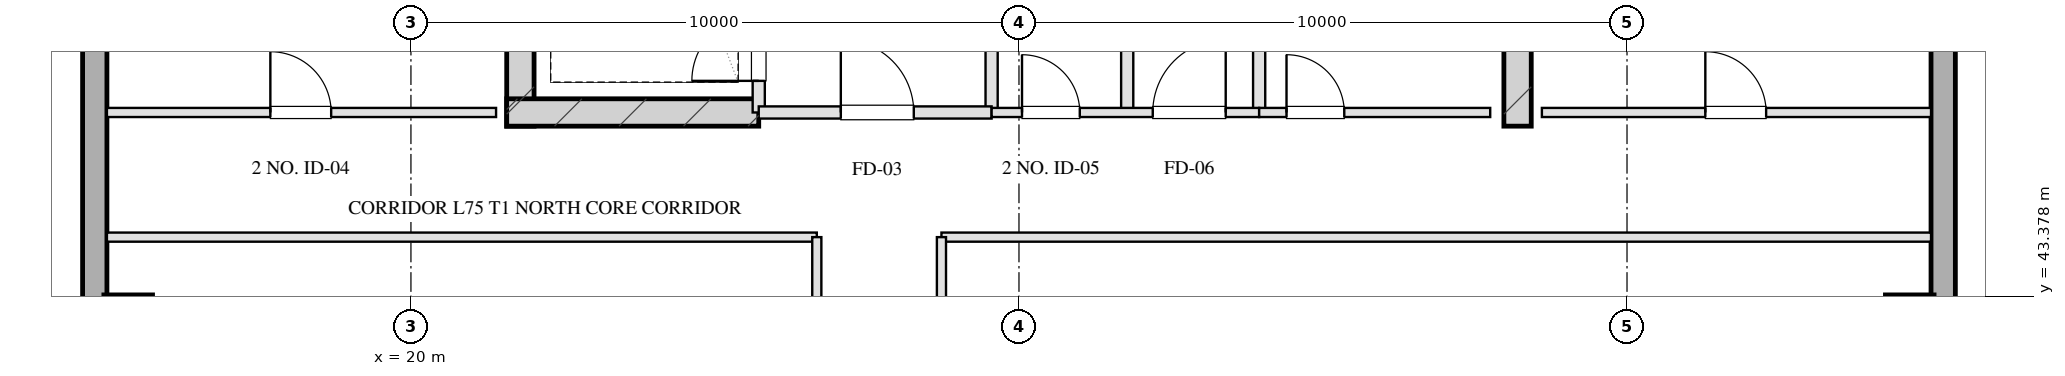
"""IFC4 building model, lengths in metres.
Left out: names, types, materials, properties, quantities, classifications, styles, units other than length and angle.
Written with IfcOpenShell. Run it as: python <this file> out.ifc"""

import sys

from ifc_helpers import new_model, si_unit, direction, frame, frame_2d, origin, origin_2d, place, context, subcontext, project, spatial, rectangle, hollow_rectangle, extrude, element, fill, save


model = new_model("IFC4")
c1 = context("Model", 3, precision=1e-05, world=origin(), true_north=direction((0.0, 1.0)))
c2 = subcontext(c1, "Body", "Model", "MODEL_VIEW")
j1 = project(units=[si_unit("LENGTHUNIT", "METRE"), si_unit("PLANEANGLEUNIT", "RADIAN")], contexts=[c1])
p1 = place(None, origin())
s1 = spatial("IfcSite", under=j1, at=p1, CompositionType="ELEMENT")
p2 = place(p1, origin())
s2 = spatial("IfcBuilding", under=s1, at=p2, CompositionType="ELEMENT")
p3 = place(p2, frame((0.0, 0.0, 272.8)))
s3 = spatial("IfcBuildingStorey", under=s2, at=p3, CompositionType="ELEMENT", Elevation=272.8)
for number, where, z_axis, x_axis in (
    (1, (21.8, 46.175, 0.0), (0.0, 0.0, 1.0), (0.0, 1.0, 0.0)),
    (2, (38.2, 46.175, 0.0), (0.0, 0.0, 1.0), (0.0, 1.0, 0.0)),
):
    element("IfcWall", number, at=place(p3, frame(where, z_axis=z_axis, x_axis=x_axis)), inside=s3, PredefinedType="SHEAR", context=c2, shape_type="SweptSolid", body=[
        extrude(rectangle(XDim=9.33, YDim=0.45, at=frame_2d((4.665, 0.0))), origin(), (0.0, 0.0, 1.0), 3.2),
    ])
p4 = place(p3, frame((21.575, 46.4, 0.0), z_axis=(0.0, 0.0, 1.0), x_axis=(1.0, 0.0, 0.0)))
e3 = element("IfcWall", 3, at=p4, inside=s3, PredefinedType="SHEAR", context=c2, shape_type="SweptSolid", body=[
    extrude(rectangle(XDim=4.145, YDim=0.45, at=frame_2d((2.073, 0.0))), origin(), (0.0, 0.0, 1.0), 3.2),
])
for number, where, z_axis, x_axis in (
    (4, (15.35, 43.0, 0.0), (0.0, 0.0, 1.0), (1.0, 0.0, 0.0)),
    (5, (44.65, 43.0, 0.0), (0.0, 0.0, 1.0), (1.0, 0.0, 0.0)),
):
    element("IfcColumn", number, at=place(p3, frame(where, z_axis=z_axis, x_axis=x_axis)), inside=s3, PredefinedType="COLUMN", context=c2, shape_type="SweptSolid", body=[
        extrude(hollow_rectangle(XDim=0.8, YDim=0.8, WallThickness=0.028, at=origin_2d()), origin(), (0.0, 0.0, 1.0), 3.201),
    ])
p5 = place(p3, frame((14.8, 13.1, 0.0), z_axis=(0.0, 0.0, 1.0), x_axis=(0.0, 1.0, 0.0)))
e6 = element("IfcWall", 6, at=p5, inside=s3, PredefinedType="SOLIDWALL", context=c2, shape_type="SweptSolid", body=[
    extrude(rectangle(XDim=41.8, YDim=0.4, at=frame_2d((20.9, 0.0))), origin(), (0.0, 0.0, 1.0), 2.36),
])
p6 = place(p5, frame((13.525, 0.0, 0.75)))
e7 = element("IfcOpeningElement", 7, at=p6, cuts=e6, PredefinedType="OPENING", context=c2, shape_type="SweptSolid", body=[
    extrude(rectangle(XDim=1.95, YDim=1.21, at=frame_2d((0.975, 0.605))), frame((0.0, 0.21, 0.0), z_axis=(0.0, -1.0, 0.0), x_axis=(1.0, 0.0, 0.0)), (0.0, 0.0, 1.0), 0.42),
])
p7 = place(p5, frame((17.325, 0.0, 0.75)))
e8 = element("IfcOpeningElement", 8, at=p7, cuts=e6, PredefinedType="OPENING", context=c2, shape_type="SweptSolid", body=[
    extrude(rectangle(XDim=1.95, YDim=1.21, at=frame_2d((0.975, 0.605))), frame((0.0, 0.21, 0.0), z_axis=(0.0, -1.0, 0.0), x_axis=(1.0, 0.0, 0.0)), (0.0, 0.0, 1.0), 0.42),
])
p8 = place(p5, frame((22.525, 0.0, 0.75)))
e9 = element("IfcOpeningElement", 9, at=p8, cuts=e6, PredefinedType="OPENING", context=c2, shape_type="SweptSolid", body=[
    extrude(rectangle(XDim=1.95, YDim=1.21, at=frame_2d((0.975, 0.605))), frame((0.0, 0.21, 0.0), z_axis=(0.0, -1.0, 0.0), x_axis=(1.0, 0.0, 0.0)), (0.0, 0.0, 1.0), 0.42),
])
p9 = place(p5, frame((26.325, 0.0, 0.75)))
e10 = element("IfcOpeningElement", 10, at=p9, cuts=e6, PredefinedType="OPENING", context=c2, shape_type="SweptSolid", body=[
    extrude(rectangle(XDim=1.95, YDim=1.21, at=frame_2d((0.975, 0.605))), frame((0.0, 0.21, 0.0), z_axis=(0.0, -1.0, 0.0), x_axis=(1.0, 0.0, 0.0)), (0.0, 0.0, 1.0), 0.42),
])
p10 = place(p3, frame((45.2, 54.9, 0.0), z_axis=(0.0, 0.0, 1.0), x_axis=(0.0, -1.0, 0.0)))
e11 = element("IfcWall", 11, at=p10, inside=s3, PredefinedType="SOLIDWALL", context=c2, shape_type="SweptSolid", body=[
    extrude(rectangle(XDim=41.8, YDim=0.4, at=frame_2d((20.9, 0.0))), origin(), (0.0, 0.0, 1.0), 2.36),
])
p11 = place(p10, frame((26.325, 0.0, 0.75)))
e12 = element("IfcOpeningElement", 12, at=p11, cuts=e11, PredefinedType="OPENING", context=c2, shape_type="SweptSolid", body=[
    extrude(rectangle(XDim=1.95, YDim=1.21, at=frame_2d((0.975, 0.605))), frame((0.0, 0.21, 0.0), z_axis=(0.0, -1.0, 0.0), x_axis=(1.0, 0.0, 0.0)), (0.0, 0.0, 1.0), 0.42),
])
p12 = place(p10, frame((22.525, 0.0, 0.75)))
e13 = element("IfcOpeningElement", 13, at=p12, cuts=e11, PredefinedType="OPENING", context=c2, shape_type="SweptSolid", body=[
    extrude(rectangle(XDim=1.95, YDim=1.21, at=frame_2d((0.975, 0.605))), frame((0.0, 0.21, 0.0), z_axis=(0.0, -1.0, 0.0), x_axis=(1.0, 0.0, 0.0)), (0.0, 0.0, 1.0), 0.42),
])
p13 = place(p10, frame((17.325, 0.0, 0.75)))
e14 = element("IfcOpeningElement", 14, at=p13, cuts=e11, PredefinedType="OPENING", context=c2, shape_type="SweptSolid", body=[
    extrude(rectangle(XDim=1.95, YDim=1.21, at=frame_2d((0.975, 0.605))), frame((0.0, 0.21, 0.0), z_axis=(0.0, -1.0, 0.0), x_axis=(1.0, 0.0, 0.0)), (0.0, 0.0, 1.0), 0.42),
])
p14 = place(p10, frame((13.525, 0.0, 0.75)))
e15 = element("IfcOpeningElement", 15, at=p14, cuts=e11, PredefinedType="OPENING", context=c2, shape_type="SweptSolid", body=[
    extrude(rectangle(XDim=1.95, YDim=1.21, at=frame_2d((0.975, 0.605))), frame((0.0, 0.21, 0.0), z_axis=(0.0, -1.0, 0.0), x_axis=(1.0, 0.0, 0.0)), (0.0, 0.0, 1.0), 0.42),
])
p15 = place(p3, frame((25.72, 46.4, 0.0), z_axis=(0.0, 0.0, 1.0), x_axis=(0.0, 1.0, 0.0)))
e16 = element("IfcWall", 16, at=p15, inside=s3, PredefinedType="PARTITIONING", context=c2, shape_type="SweptSolid", body=[
    extrude(rectangle(XDim=1.9, YDim=0.2, at=frame_2d((0.95, 0.0))), origin(), (0.0, 0.0, 1.0), 2.925),
])
p16 = place(p15, frame((0.52, 0.0, 0.0)))
e17 = element("IfcOpeningElement", 17, at=p16, cuts=e16, PredefinedType="OPENING", context=c2, shape_type="SweptSolid", body=[
    extrude(rectangle(XDim=1.1, YDim=2.05, at=frame_2d((0.55, 1.025))), frame((0.0, 0.11, 0.0), z_axis=(0.0, -1.0, 0.0), x_axis=(1.0, 0.0, 0.0)), (0.0, 0.0, 1.0), 0.22),
])
p17 = place(p3, frame((29.55, 46.4, 0.0), z_axis=(0.0, 0.0, 1.0), x_axis=(0.0, 1.0, 0.0)))
e18 = element("IfcWall", 18, at=p17, inside=s3, PredefinedType="PARTITIONING", context=c2, shape_type="SweptSolid", body=[
    extrude(rectangle(XDim=8.43, YDim=0.2, at=frame_2d((4.215, 0.0))), origin(), (0.0, 0.0, 1.0), 2.925),
])
p18 = place(p3, frame((25.72, 46.4, 0.0), z_axis=(0.0, 0.0, 1.0), x_axis=(1.0, 0.0, 0.0)))
e19 = element("IfcWall", 19, at=p18, inside=s3, PredefinedType="PARTITIONING", context=c2, shape_type="SweptSolid", body=[
    extrude(rectangle(XDim=3.83, YDim=0.2, at=frame_2d((1.915, 0.0))), origin(), (0.0, 0.0, 1.0), 2.925),
])
p19 = place(p18, frame((1.35, 0.0, 0.0)))
e20 = element("IfcOpeningElement", 20, at=p19, cuts=e19, PredefinedType="OPENING", context=c2, shape_type="SweptSolid", body=[
    extrude(rectangle(XDim=1.2, YDim=2.05, at=frame_2d((0.6, 1.025))), frame((0.0, 0.11, 0.0), z_axis=(0.0, -1.0, 0.0), x_axis=(1.0, 0.0, 0.0)), (0.0, 0.0, 1.0), 0.22),
])
for number, where, z_axis, x_axis in (
    (21, (33.95, 46.4, 0.0), (0.0, 0.0, 1.0), (0.0, 1.0, 0.0)),
    (22, (31.78, 46.4, 0.0), (0.0, 0.0, 1.0), (0.0, 1.0, 0.0)),
):
    element("IfcWall", number, at=place(p3, frame(where, z_axis=z_axis, x_axis=x_axis)), inside=s3, PredefinedType="PARTITIONING", context=c2, shape_type="SweptSolid", body=[
        extrude(rectangle(XDim=8.43, YDim=0.2, at=frame_2d((4.215, 0.0))), origin(), (0.0, 0.0, 1.0), 2.925),
    ])
p20 = place(p3, frame((29.55, 46.4, 0.0), z_axis=(0.0, 0.0, 1.0), x_axis=(1.0, 0.0, 0.0)))
e23 = element("IfcWall", 23, at=p20, inside=s3, PredefinedType="PARTITIONING", context=c2, shape_type="SweptSolid", body=[
    extrude(rectangle(XDim=4.4, YDim=0.15, at=frame_2d((2.2, 0.0))), origin(), (0.0, 0.0, 1.0), 2.925),
])
p21 = place(p20, frame((0.5, 0.0, 0.0)))
e24 = element("IfcOpeningElement", 24, at=p21, cuts=e23, PredefinedType="OPENING", context=c2, shape_type="SweptSolid", body=[
    extrude(rectangle(XDim=0.95, YDim=2.05, at=frame_2d((0.475, 1.025))), frame((0.0, 0.085, 0.0), z_axis=(0.0, -1.0, 0.0), x_axis=(1.0, 0.0, 0.0)), (0.0, 0.0, 1.0), 0.17),
])
p22 = place(p20, frame((2.65, 0.0, 0.0)))
e25 = element("IfcOpeningElement", 25, at=p22, cuts=e23, PredefinedType="OPENING", context=c2, shape_type="SweptSolid", body=[
    extrude(rectangle(XDim=1.2, YDim=2.05, at=frame_2d((0.6, 1.025))), frame((0.0, 0.085, 0.0), z_axis=(0.0, -1.0, 0.0), x_axis=(1.0, 0.0, 0.0)), (0.0, 0.0, 1.0), 0.17),
])
p23 = place(p3, frame((33.95, 46.4, 0.0), z_axis=(0.0, 0.0, 1.0), x_axis=(1.0, 0.0, 0.0)))
e26 = element("IfcWall", 26, at=p23, inside=s3, PredefinedType="PARTITIONING", context=c2, shape_type="SweptSolid", body=[
    extrude(rectangle(XDim=3.8, YDim=0.15, at=frame_2d((1.9, 0.0))), origin(), (0.0, 0.0, 1.0), 2.925),
])
p24 = place(p23, frame((0.45, 0.0, 0.0)))
e27 = element("IfcOpeningElement", 27, at=p24, cuts=e26, PredefinedType="OPENING", context=c2, shape_type="SweptSolid", body=[
    extrude(rectangle(XDim=0.95, YDim=2.05, at=frame_2d((0.475, 1.025))), frame((0.0, 0.085, 0.0), z_axis=(0.0, -1.0, 0.0), x_axis=(1.0, 0.0, 0.0)), (0.0, 0.0, 1.0), 0.17),
])
p25 = place(p3, frame((15.0, 46.4, 0.0), z_axis=(0.0, 0.0, 1.0), x_axis=(1.0, 0.0, 0.0)))
e28 = element("IfcWall", 28, at=p25, inside=s3, PredefinedType="PARTITIONING", context=c2, shape_type="SweptSolid", body=[
    extrude(rectangle(XDim=6.4, YDim=0.15, at=frame_2d((3.2, 0.0))), origin(), (0.0, 0.0, 1.0), 2.925),
])
p26 = place(p25, frame((2.688, 0.0, 0.0)))
e29 = element("IfcOpeningElement", 29, at=p26, cuts=e28, PredefinedType="OPENING", context=c2, shape_type="SweptSolid", body=[
    extrude(rectangle(XDim=1.0, YDim=2.05, at=frame_2d((0.5, 1.025))), frame((0.0, 0.085, 0.0), z_axis=(0.0, -1.0, 0.0), x_axis=(1.0, 0.0, 0.0)), (0.0, 0.0, 1.0), 0.17),
])
p27 = place(p3, frame((38.6, 46.4, 0.0), z_axis=(0.0, 0.0, 1.0), x_axis=(1.0, 0.0, 0.0)))
e30 = element("IfcWall", 30, at=p27, inside=s3, PredefinedType="PARTITIONING", context=c2, shape_type="SweptSolid", body=[
    extrude(rectangle(XDim=6.4, YDim=0.15, at=frame_2d((3.2, 0.0))), origin(), (0.0, 0.0, 1.0), 2.925),
])
p28 = place(p27, frame((2.688, 0.0, 0.0)))
e31 = element("IfcOpeningElement", 31, at=p28, cuts=e30, PredefinedType="OPENING", context=c2, shape_type="SweptSolid", body=[
    extrude(rectangle(XDim=1.0, YDim=2.05, at=frame_2d((0.5, 1.025))), frame((0.0, 0.085, 0.0), z_axis=(0.0, -1.0, 0.0), x_axis=(1.0, 0.0, 0.0)), (0.0, 0.0, 1.0), 0.17),
])
p29 = place(p3, frame((15.0, 44.35, 0.0), z_axis=(0.0, 0.0, 1.0), x_axis=(1.0, 0.0, 0.0)))
e32 = element("IfcWall", 32, at=p29, inside=s3, PredefinedType="PARTITIONING", context=c2, shape_type="SweptSolid", body=[
    extrude(rectangle(XDim=11.675, YDim=0.15, at=frame_2d((5.837, 0.0))), origin(), (0.0, 0.0, 1.0), 2.925),
])
p30 = place(p3, frame((28.725, 44.35, 0.0), z_axis=(0.0, 0.0, 1.0), x_axis=(1.0, 0.0, 0.0)))
e33 = element("IfcWall", 33, at=p30, inside=s3, PredefinedType="PARTITIONING", context=c2, shape_type="SweptSolid", body=[
    extrude(rectangle(XDim=16.275, YDim=0.15, at=frame_2d((8.137, 0.0))), origin(), (0.0, 0.0, 1.0), 2.925),
])
p31 = place(p3, frame((26.675, 23.65, 0.0), z_axis=(0.0, 0.0, 1.0), x_axis=(0.0, 1.0, 0.0)))
e34 = element("IfcWall", 34, at=p31, inside=s3, PredefinedType="PARTITIONING", context=c2, shape_type="SweptSolid", body=[
    extrude(rectangle(XDim=20.7, YDim=0.15, at=frame_2d((10.35, 0.0))), origin(), (0.0, 0.0, 1.0), 2.925),
])
p32 = place(p31, frame((2.175, 0.0, 0.0)))
e35 = element("IfcOpeningElement", 35, at=p32, cuts=e34, PredefinedType="OPENING", context=c2, shape_type="SweptSolid", body=[
    extrude(rectangle(XDim=0.85, YDim=2.05, at=frame_2d((0.425, 1.025))), frame((0.0, 0.085, 0.0), z_axis=(0.0, -1.0, 0.0), x_axis=(1.0, 0.0, 0.0)), (0.0, 0.0, 1.0), 0.17),
])
p33 = place(p31, frame((6.999, 0.0, 0.0)))
e36 = element("IfcOpeningElement", 36, at=p33, cuts=e34, PredefinedType="OPENING", context=c2, shape_type="SweptSolid", body=[
    extrude(rectangle(XDim=1.0, YDim=2.05, at=frame_2d((0.5, 1.025))), frame((0.0, 0.085, 0.0), z_axis=(0.0, -1.0, 0.0), x_axis=(1.0, 0.0, 0.0)), (0.0, 0.0, 1.0), 0.17),
])
p34 = place(p31, frame((11.838, 0.0, 0.0)))
e37 = element("IfcOpeningElement", 37, at=p34, cuts=e34, PredefinedType="OPENING", context=c2, shape_type="SweptSolid", body=[
    extrude(rectangle(XDim=1.05, YDim=2.05, at=frame_2d((0.525, 1.025))), frame((0.0, 0.085, 0.0), z_axis=(0.0, -1.0, 0.0), x_axis=(1.0, 0.0, 0.0)), (0.0, 0.0, 1.0), 0.17),
])
p35 = place(p31, frame((17.365, 0.0, 0.0)))
e38 = element("IfcOpeningElement", 38, at=p35, cuts=e34, PredefinedType="OPENING", context=c2, shape_type="SweptSolid", body=[
    extrude(rectangle(XDim=1.0, YDim=2.05, at=frame_2d((0.5, 1.025))), frame((0.0, 0.085, 0.0), z_axis=(0.0, -1.0, 0.0), x_axis=(1.0, 0.0, 0.0)), (0.0, 0.0, 1.0), 0.17),
])
p36 = place(p3, frame((28.725, 23.65, 0.0), z_axis=(0.0, 0.0, 1.0), x_axis=(0.0, 1.0, 0.0)))
e39 = element("IfcWall", 39, at=p36, inside=s3, PredefinedType="PARTITIONING", context=c2, shape_type="SweptSolid", body=[
    extrude(rectangle(XDim=20.7, YDim=0.15, at=frame_2d((10.35, 0.0))), origin(), (0.0, 0.0, 1.0), 2.925),
])
p37 = place(p36, frame((2.675, 0.0, 0.0)))
e40 = element("IfcOpeningElement", 40, at=p37, cuts=e39, PredefinedType="OPENING", context=c2, shape_type="SweptSolid", body=[
    extrude(rectangle(XDim=1.0, YDim=2.05, at=frame_2d((0.5, 1.025))), frame((0.0, 0.085, 0.0), z_axis=(0.0, -1.0, 0.0), x_axis=(1.0, 0.0, 0.0)), (0.0, 0.0, 1.0), 0.17),
])
p38 = place(p36, frame((9.857, 0.0, 0.0)))
e41 = element("IfcOpeningElement", 41, at=p38, cuts=e39, PredefinedType="OPENING", context=c2, shape_type="SweptSolid", body=[
    extrude(rectangle(XDim=1.0, YDim=2.05, at=frame_2d((0.5, 1.025))), frame((0.0, 0.085, 0.0), z_axis=(0.0, -1.0, 0.0), x_axis=(1.0, 0.0, 0.0)), (0.0, 0.0, 1.0), 0.17),
])
p39 = place(p36, frame((17.032, 0.0, 0.0)))
e42 = element("IfcOpeningElement", 42, at=p39, cuts=e39, PredefinedType="OPENING", context=c2, shape_type="SweptSolid", body=[
    extrude(rectangle(XDim=1.0, YDim=2.05, at=frame_2d((0.5, 1.025))), frame((0.0, 0.085, 0.0), z_axis=(0.0, -1.0, 0.0), x_axis=(1.0, 0.0, 0.0)), (0.0, 0.0, 1.0), 0.17),
])
p40 = place(p16, origin())
e43 = element("IfcDoor", 43, at=p40, inside=s3, OperationType="SINGLE_SWING_LEFT", PredefinedType="DOOR", context=c2, shape_type="SweptSolid", body=[
    extrude(rectangle(XDim=1.1, YDim=2.05, at=frame_2d((0.55, 1.025))), frame((0.0, 0.025, 0.0), z_axis=(0.0, -1.0, 0.0), x_axis=(1.0, 0.0, 0.0)), (0.0, 0.0, 1.0), 0.05),
])
fill(e17, e43)
p41 = place(p19, origin())
e44 = element("IfcDoor", 44, at=p41, inside=s3, OperationType="SINGLE_SWING_LEFT", PredefinedType="DOOR", context=c2, shape_type="SweptSolid", body=[
    extrude(rectangle(XDim=1.2, YDim=2.05, at=frame_2d((0.6, 1.025))), frame((0.0, 0.025, 0.0), z_axis=(0.0, -1.0, 0.0), x_axis=(1.0, 0.0, 0.0)), (0.0, 0.0, 1.0), 0.05),
])
fill(e20, e44)
p42 = place(p21, origin())
e45 = element("IfcDoor", 45, at=p42, inside=s3, OperationType="SINGLE_SWING_LEFT", PredefinedType="DOOR", context=c2, shape_type="SweptSolid", body=[
    extrude(rectangle(XDim=0.95, YDim=2.05, at=frame_2d((0.475, 1.025))), frame((0.0, 0.025, 0.0), z_axis=(0.0, -1.0, 0.0), x_axis=(1.0, 0.0, 0.0)), (0.0, 0.0, 1.0), 0.05),
])
fill(e24, e45)
p43 = place(p22, origin())
e46 = element("IfcDoor", 46, at=p43, inside=s3, OperationType="SINGLE_SWING_RIGHT", PredefinedType="DOOR", context=c2, shape_type="SweptSolid", body=[
    extrude(rectangle(XDim=1.2, YDim=2.05, at=frame_2d((0.6, 1.025))), frame((0.0, 0.025, 0.0), z_axis=(0.0, -1.0, 0.0), x_axis=(1.0, 0.0, 0.0)), (0.0, 0.0, 1.0), 0.05),
])
fill(e25, e46)
p44 = place(p24, origin())
e47 = element("IfcDoor", 47, at=p44, inside=s3, OperationType="SINGLE_SWING_LEFT", PredefinedType="DOOR", context=c2, shape_type="SweptSolid", body=[
    extrude(rectangle(XDim=0.95, YDim=2.05, at=frame_2d((0.475, 1.025))), frame((0.0, 0.025, 0.0), z_axis=(0.0, -1.0, 0.0), x_axis=(1.0, 0.0, 0.0)), (0.0, 0.0, 1.0), 0.05),
])
fill(e27, e47)
p45 = place(p26, origin())
e48 = element("IfcDoor", 48, at=p45, inside=s3, OperationType="SINGLE_SWING_LEFT", PredefinedType="DOOR", context=c2, shape_type="SweptSolid", body=[
    extrude(rectangle(XDim=1.0, YDim=2.05, at=frame_2d((0.5, 1.025))), frame((0.0, 0.025, 0.0), z_axis=(0.0, -1.0, 0.0), x_axis=(1.0, 0.0, 0.0)), (0.0, 0.0, 1.0), 0.05),
])
fill(e29, e48)
p46 = place(p28, origin())
e49 = element("IfcDoor", 49, at=p46, inside=s3, OperationType="SINGLE_SWING_LEFT", PredefinedType="DOOR", context=c2, shape_type="SweptSolid", body=[
    extrude(rectangle(XDim=1.0, YDim=2.05, at=frame_2d((0.5, 1.025))), frame((0.0, 0.025, 0.0), z_axis=(0.0, -1.0, 0.0), x_axis=(1.0, 0.0, 0.0)), (0.0, 0.0, 1.0), 0.05),
])
fill(e31, e49)
save(model, sys.argv[1])
